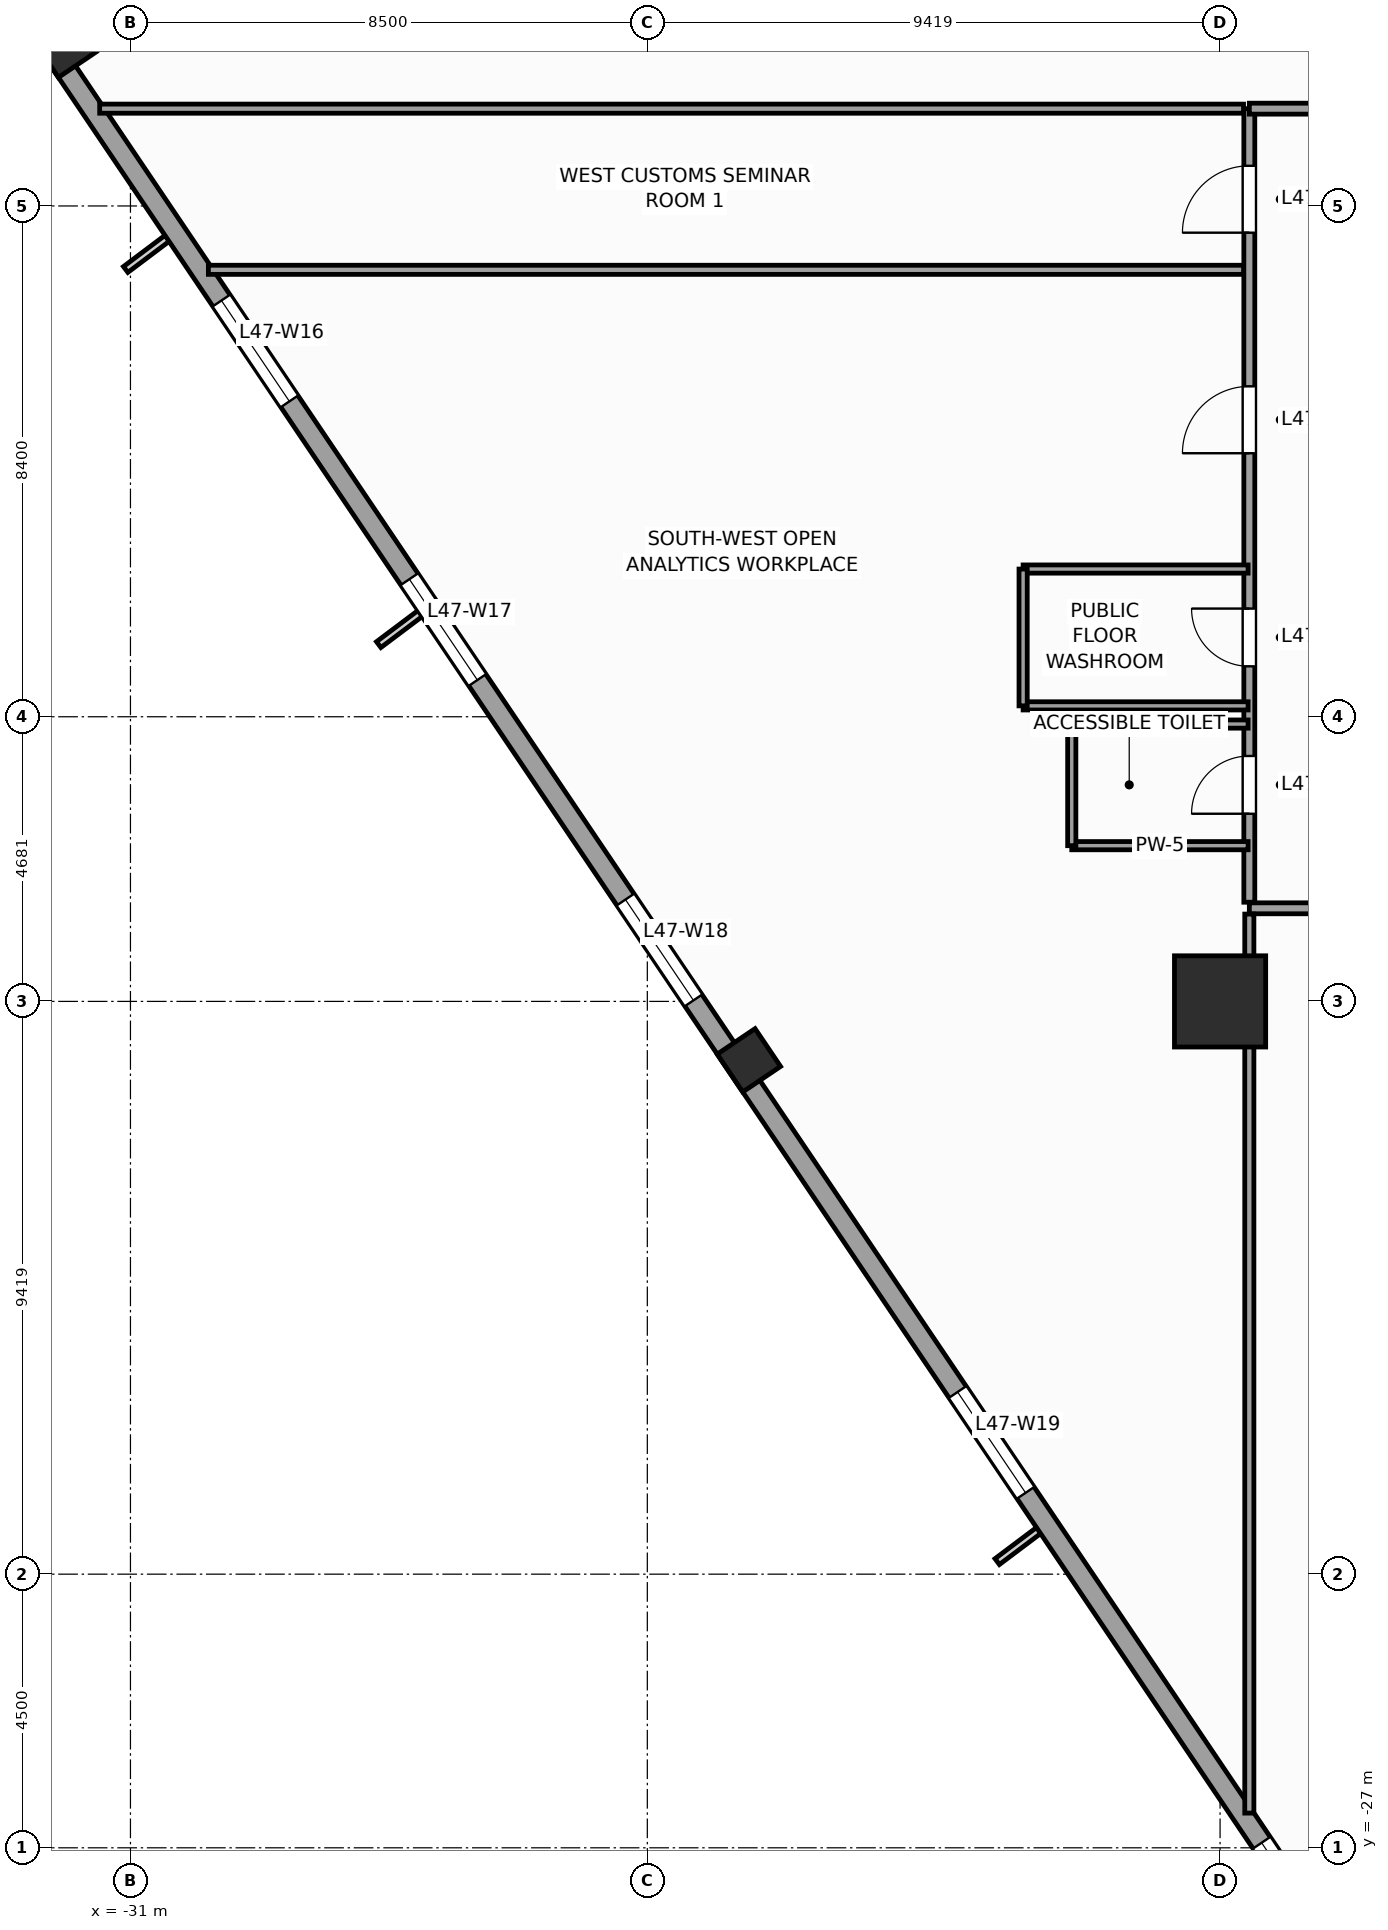
"""IFC4 building model, lengths in metres.
Left out: names, types, materials, properties, quantities, classifications, styles, units other than length and angle.
Written with IfcOpenShell. Run it as: python <this file> out.ifc"""

import sys

from ifc_helpers import new_model, si_unit, direction, frame, frame_2d, origin, origin_2d, place, context, subcontext, project, spatial, rectangle, extrude, source, transform, mapped, element, fill, save


model = new_model("IFC4")
c1 = context("Model", 3, precision=1e-05, world=origin(), true_north=direction((0.0, 1.0)))
c2 = subcontext(c1, "Body", "Model", "MODEL_VIEW")
j1 = project(units=[si_unit("LENGTHUNIT", "METRE"), si_unit("PLANEANGLEUNIT", "RADIAN")], contexts=[c1])
p1 = place(None, origin())
s1 = spatial("IfcSite", under=j1, at=p1, CompositionType="ELEMENT")
p2 = place(p1, origin())
s2 = spatial("IfcBuilding", under=s1, at=p2, CompositionType="ELEMENT")
p3 = place(p2, frame((0.0, 0.0, 196.4)))
s3 = spatial("IfcBuildingStorey", under=s2, at=p3, CompositionType="ELEMENT", Elevation=196.4)
m1 = source(origin(), c2, "Body", "SweptSolid", [
    extrude(rectangle(XDim=1.5, YDim=1.5, at=origin_2d()), origin(), (0.0, 0.0, 1.0), 4.0),
])
p4 = place(p3, frame((-13.081, -13.081, 0.0), z_axis=(0.0, 0.0, 1.0), x_axis=(1.0, 0.0, 0.0)))
e1 = element("IfcColumn", 1, at=p4, inside=s3, PredefinedType="COLUMN", context=c2, shape_type="MappedRepresentation", body=[
    mapped(m1, transform((0.0, 0.0, 0.0), scale=1.0)),
])
m2 = source(origin(), c2, "Body", "SweptSolid", [
    extrude(rectangle(XDim=0.75, YDim=0.75, at=origin_2d()), origin(), (0.0, 0.0, 1.0), 4.0),
])
for number, where, z_axis, x_axis in (
    (2, (-32.083, 2.635, 0.0), (0.0, 0.0, 1.0), (0.829, 0.559, 0.0)),
    (3, (-20.83, -14.05, 0.0), (0.0, 0.0, 1.0), (0.829, 0.559, 0.0)),
):
    element("IfcColumn", number, at=place(p3, frame(where, z_axis=z_axis, x_axis=x_axis)), inside=s3, PredefinedType="COLUMN", context=c2, shape_type="MappedRepresentation", body=[
        mapped(m2, transform((0.0, 0.0, 0.0), scale=1.0)),
    ])
p5 = place(p3, frame((-28.223, 5.486, 0.0), z_axis=(0.0, 0.0, 1.0), x_axis=(-0.82905227345, -0.559171107879, 0.0)))
e4 = element("IfcWall", 4, at=p5, inside=s3, PredefinedType="STANDARD", context=c2, shape_type="SweptSolid", body=[
    extrude(rectangle(XDim=5.17, YDim=0.34, at=frame_2d((2.585, 0.0))), origin(), (0.0, 0.0, 1.0), 2.2),
])
p6 = place(p3, frame((-32.558, 2.972, 0.0), z_axis=(0.0, 0.0, 1.0), x_axis=(0.559194910251, -0.829036218961, 0.0)))
e5 = element("IfcWall", 5, at=p6, inside=s3, PredefinedType="STANDARD", context=c2, shape_type="SweptSolid", body=[
    extrude(rectangle(XDim=41.34, YDim=0.34, at=frame_2d((20.67, 0.0))), origin(), (0.0, 0.0, 1.0), 2.2),
])
p7 = place(p6, frame((5.461, 0.0, 0.67)))
e6 = element("IfcOpeningElement", 6, at=p7, cuts=e5, PredefinedType="OPENING", context=c2, shape_type="SweptSolid", body=[
    extrude(rectangle(XDim=2.0, YDim=1.45, at=frame_2d((1.0, 0.725))), frame((0.0, 0.18, 0.0), z_axis=(0.0, -1.0, 0.0), x_axis=(1.0, 0.0, 0.0)), (0.0, 0.0, 1.0), 0.36),
])
p8 = place(p6, frame((10.989, 0.0, 0.67)))
e7 = element("IfcOpeningElement", 7, at=p8, cuts=e5, PredefinedType="OPENING", context=c2, shape_type="SweptSolid", body=[
    extrude(rectangle(XDim=2.0, YDim=1.45, at=frame_2d((1.0, 0.725))), frame((0.0, 0.18, 0.0), z_axis=(0.0, -1.0, 0.0), x_axis=(1.0, 0.0, 0.0)), (0.0, 0.0, 1.0), 0.36),
])
p9 = place(p6, frame((17.343, 0.0, 0.67)))
e8 = element("IfcOpeningElement", 8, at=p9, cuts=e5, PredefinedType="OPENING", context=c2, shape_type="SweptSolid", body=[
    extrude(rectangle(XDim=2.0, YDim=1.45, at=frame_2d((1.0, 0.725))), frame((0.0, 0.18, 0.0), z_axis=(0.0, -1.0, 0.0), x_axis=(1.0, 0.0, 0.0)), (0.0, 0.0, 1.0), 0.36),
])
p10 = place(p6, frame((27.111, 0.0, 0.67)))
e9 = element("IfcOpeningElement", 9, at=p10, cuts=e5, PredefinedType="OPENING", context=c2, shape_type="SweptSolid", body=[
    extrude(rectangle(XDim=2.0, YDim=1.45, at=frame_2d((1.0, 0.725))), frame((0.0, 0.18, 0.0), z_axis=(0.0, -1.0, 0.0), x_axis=(1.0, 0.0, 0.0)), (0.0, 0.0, 1.0), 0.36),
])
p11 = place(p6, frame((36.052, 0.0, 0.67)))
e10 = element("IfcOpeningElement", 10, at=p11, cuts=e5, PredefinedType="OPENING", context=c2, shape_type="SweptSolid", body=[
    extrude(rectangle(XDim=2.0, YDim=1.45, at=frame_2d((1.0, 0.725))), frame((0.0, 0.18, 0.0), z_axis=(0.0, -1.0, 0.0), x_axis=(1.0, 0.0, 0.0)), (0.0, 0.0, 1.0), 0.36),
])
p12 = place(p3, frame((-12.6, -11.55, 0.0), z_axis=(0.0, 0.0, 1.0), x_axis=(1.0, 0.0, 0.0)))
e11 = element("IfcWall", 11, at=p12, inside=s3, PredefinedType="PARTITIONING", context=c2, shape_type="SweptSolid", body=[
    extrude(rectangle(XDim=25.2, YDim=0.18, at=frame_2d((12.6, 0.0))), origin(), (0.0, 0.0, 1.0), 3.6),
])
p13 = place(p12, frame((3.165, 0.0, 0.0)))
e12 = element("IfcOpeningElement", 12, at=p13, cuts=e11, PredefinedType="OPENING", context=c2, shape_type="SweptSolid", body=[
    extrude(rectangle(XDim=1.1, YDim=2.2, at=frame_2d((0.55, 1.1))), frame((0.0, 0.1, 0.0), z_axis=(0.0, -1.0, 0.0), x_axis=(1.0, 0.0, 0.0)), (0.0, 0.0, 1.0), 0.2),
])
p14 = place(p12, frame((9.3, 0.0, 0.0)))
e13 = element("IfcOpeningElement", 13, at=p14, cuts=e11, PredefinedType="OPENING", context=c2, shape_type="SweptSolid", body=[
    extrude(rectangle(XDim=1.1, YDim=2.2, at=frame_2d((0.55, 1.1))), frame((0.0, 0.1, 0.0), z_axis=(0.0, -1.0, 0.0), x_axis=(1.0, 0.0, 0.0)), (0.0, 0.0, 1.0), 0.2),
])
p15 = place(p12, frame((14.8, 0.0, 0.0)))
e14 = element("IfcOpeningElement", 14, at=p15, cuts=e11, PredefinedType="OPENING", context=c2, shape_type="SweptSolid", body=[
    extrude(rectangle(XDim=1.1, YDim=2.2, at=frame_2d((0.55, 1.1))), frame((0.0, 0.1, 0.0), z_axis=(0.0, -1.0, 0.0), x_axis=(1.0, 0.0, 0.0)), (0.0, 0.0, 1.0), 0.2),
])
p16 = place(p12, frame((20.936, 0.0, 0.0)))
e15 = element("IfcOpeningElement", 15, at=p16, cuts=e11, PredefinedType="OPENING", context=c2, shape_type="SweptSolid", body=[
    extrude(rectangle(XDim=1.1, YDim=2.2, at=frame_2d((0.55, 1.1))), frame((0.0, 0.1, 0.0), z_axis=(0.0, -1.0, 0.0), x_axis=(1.0, 0.0, 0.0)), (0.0, 0.0, 1.0), 0.2),
])
p17 = place(p3, frame((-12.6, -11.45, 0.0), z_axis=(0.0, 0.0, 1.0), x_axis=(0.0, 1.0, 0.0)))
e16 = element("IfcWall", 16, at=p17, inside=s3, PredefinedType="PARTITIONING", context=c2, shape_type="SweptSolid", body=[
    extrude(rectangle(XDim=13.05, YDim=0.18, at=frame_2d((6.525, 0.0))), origin(), (0.0, 0.0, 1.0), 2.56),
])
p18 = place(p17, frame((1.455, 0.0, 0.0)))
e17 = element("IfcOpeningElement", 17, at=p18, cuts=e16, PredefinedType="OPENING", context=c2, shape_type="SweptSolid", body=[
    extrude(rectangle(XDim=0.95, YDim=2.1, at=frame_2d((0.475, 1.05))), frame((0.0, 0.1, 0.0), z_axis=(0.0, -1.0, 0.0), x_axis=(1.0, 0.0, 0.0)), (0.0, 0.0, 1.0), 0.2),
])
p19 = place(p17, frame((3.879, 0.0, 0.0)))
e18 = element("IfcOpeningElement", 18, at=p19, cuts=e16, PredefinedType="OPENING", context=c2, shape_type="SweptSolid", body=[
    extrude(rectangle(XDim=0.95, YDim=2.1, at=frame_2d((0.475, 1.05))), frame((0.0, 0.1, 0.0), z_axis=(0.0, -1.0, 0.0), x_axis=(1.0, 0.0, 0.0)), (0.0, 0.0, 1.0), 0.2),
])
p20 = place(p17, frame((11.01, 0.0, 0.0)))
e19 = element("IfcOpeningElement", 19, at=p20, cuts=e16, PredefinedType="OPENING", context=c2, shape_type="SweptSolid", body=[
    extrude(rectangle(XDim=1.1, YDim=2.2, at=frame_2d((0.55, 1.1))), frame((0.0, 0.1, 0.0), z_axis=(0.0, -1.0, 0.0), x_axis=(1.0, 0.0, 0.0)), (0.0, 0.0, 1.0), 0.2),
])
p21 = place(p17, frame((7.384, 0.0, 0.0)))
e20 = element("IfcOpeningElement", 20, at=p21, cuts=e16, PredefinedType="OPENING", context=c2, shape_type="SweptSolid", body=[
    extrude(rectangle(XDim=1.1, YDim=2.2, at=frame_2d((0.55, 1.1))), frame((0.0, 0.1, 0.0), z_axis=(0.0, -1.0, 0.0), x_axis=(1.0, 0.0, 0.0)), (0.0, 0.0, 1.0), 0.2),
])
p22 = place(p3, frame((-12.6, 1.6, 0.0), z_axis=(0.0, 0.0, 1.0), x_axis=(1.0, 0.0, 0.0)))
e21 = element("IfcWall", 21, at=p22, inside=s3, PredefinedType="PARTITIONING", context=c2, shape_type="SweptSolid", body=[
    extrude(rectangle(XDim=3.9, YDim=0.18, at=frame_2d((1.95, 0.0))), origin(), (0.0, 0.0, 1.0), 3.6),
])
p23 = place(p22, frame((1.4, 0.0, 0.0)))
e22 = element("IfcOpeningElement", 22, at=p23, cuts=e21, PredefinedType="OPENING", context=c2, shape_type="SweptSolid", body=[
    extrude(rectangle(XDim=1.1, YDim=2.2, at=frame_2d((0.55, 1.1))), frame((0.0, 0.1, 0.0), z_axis=(0.0, -1.0, 0.0), x_axis=(1.0, 0.0, 0.0)), (0.0, 0.0, 1.0), 0.2),
])
p24 = place(p3, frame((-29.719, -1.05, 0.0), z_axis=(0.0, 0.0, 1.0), x_axis=(1.0, 0.0, 0.0)))
e23 = element("IfcWall", 23, at=p24, inside=s3, PredefinedType="PARTITIONING", context=c2, shape_type="SweptSolid", body=[
    extrude(rectangle(XDim=17.023, YDim=0.15, at=frame_2d((8.512, 0.0))), origin(), (0.0, 0.0, 1.0), 3.6),
])
p25 = place(p3, frame((-31.506, 1.6, 0.0), z_axis=(0.0, 0.0, 1.0), x_axis=(1.0, 0.0, 0.0)))
e24 = element("IfcWall", 24, at=p25, inside=s3, PredefinedType="PARTITIONING", context=c2, shape_type="SweptSolid", body=[
    extrude(rectangle(XDim=18.811, YDim=0.15, at=frame_2d((9.406, 0.0))), origin(), (0.0, 0.0, 1.0), 3.6),
])
p26 = place(p3, frame((-12.6, -26.429, 0.0), z_axis=(0.0, 0.0, 1.0), x_axis=(0.0, 1.0, 0.0)))
e25 = element("IfcWall", 25, at=p26, inside=s3, PredefinedType="PARTITIONING", context=c2, shape_type="SweptSolid", body=[
    extrude(rectangle(XDim=14.784, YDim=0.15, at=frame_2d((7.392, 0.0))), origin(), (0.0, 0.0, 1.0), 2.2),
])
for number, where, z_axis, x_axis in (
    (26, (-15.52, -10.52, 0.0), (0.0, 0.0, 1.0), (1.0, 0.0, 0.0)),
    (27, (-15.52, -8.52, 0.0), (0.0, 0.0, 1.0), (1.0, 0.0, 0.0)),
):
    element("IfcWall", number, at=place(p3, frame(where, z_axis=z_axis, x_axis=x_axis)), inside=s3, PredefinedType="PARTITIONING", context=c2, shape_type="SweptSolid", body=[
        extrude(rectangle(XDim=2.9, YDim=0.135, at=frame_2d((1.45, 0.0))), origin(), (0.0, 0.0, 1.0), 3.6),
    ])
p27 = place(p3, frame((-15.52, -10.52, 0.0), z_axis=(0.0, 0.0, 1.0), x_axis=(0.0, 1.0, 0.0)))
e28 = element("IfcWall", 28, at=p27, inside=s3, PredefinedType="PARTITIONING", context=c2, shape_type="SweptSolid", body=[
    extrude(rectangle(XDim=2.0, YDim=0.135, at=frame_2d((1.0, 0.0))), origin(), (0.0, 0.0, 1.0), 3.6),
])
for number, where, z_axis, x_axis in (
    (29, (-16.32, -8.221, 0.0), (0.0, 0.0, 1.0), (1.0, 0.0, 0.0)),
    (30, (-16.32, -5.971, 0.0), (0.0, 0.0, 1.0), (1.0, 0.0, 0.0)),
):
    element("IfcWall", number, at=place(p3, frame(where, z_axis=z_axis, x_axis=x_axis)), inside=s3, PredefinedType="PARTITIONING", context=c2, shape_type="SweptSolid", body=[
        extrude(rectangle(XDim=3.7, YDim=0.135, at=frame_2d((1.85, 0.0))), origin(), (0.0, 0.0, 1.0), 3.6),
    ])
p28 = place(p3, frame((-16.32, -8.221, 0.0), z_axis=(0.0, 0.0, 1.0), x_axis=(0.0, 1.0, 0.0)))
e31 = element("IfcWall", 31, at=p28, inside=s3, PredefinedType="PARTITIONING", context=c2, shape_type="SweptSolid", body=[
    extrude(rectangle(XDim=2.25, YDim=0.135, at=frame_2d((1.125, 0.0))), origin(), (0.0, 0.0, 1.0), 3.6),
])
m3 = source(origin(), c2, "Body", "SweptSolid", [
    extrude(rectangle(XDim=2.0, YDim=1.45, at=frame_2d((1.0, 0.725))), frame((0.0, 0.03, 0.0), z_axis=(0.0, -1.0, 0.0), x_axis=(1.0, 0.0, 0.0)), (0.0, 0.0, 1.0), 0.06),
])
p29 = place(p7, origin())
e32 = element("IfcWindow", 32, at=p29, inside=s3, PartitioningType="SINGLE_PANEL", PredefinedType="WINDOW", context=c2, shape_type="MappedRepresentation", body=[
    mapped(m3, transform((0.0, 0.0, 0.0), scale=1.0)),
])
fill(e6, e32)
p30 = place(p8, origin())
e33 = element("IfcWindow", 33, at=p30, inside=s3, PartitioningType="SINGLE_PANEL", PredefinedType="WINDOW", context=c2, shape_type="MappedRepresentation", body=[
    mapped(m3, transform((0.0, 0.0, 0.0), scale=1.0)),
])
fill(e7, e33)
p31 = place(p9, origin())
e34 = element("IfcWindow", 34, at=p31, inside=s3, PartitioningType="SINGLE_PANEL", PredefinedType="WINDOW", context=c2, shape_type="MappedRepresentation", body=[
    mapped(m3, transform((0.0, 0.0, 0.0), scale=1.0)),
])
fill(e8, e34)
p32 = place(p10, origin())
e35 = element("IfcWindow", 35, at=p32, inside=s3, PartitioningType="SINGLE_PANEL", PredefinedType="WINDOW", context=c2, shape_type="MappedRepresentation", body=[
    mapped(m3, transform((0.0, 0.0, 0.0), scale=1.0)),
])
fill(e9, e35)
p33 = place(p11, origin())
e36 = element("IfcWindow", 36, at=p33, inside=s3, PartitioningType="SINGLE_PANEL", PredefinedType="WINDOW", context=c2, shape_type="MappedRepresentation", body=[
    mapped(m3, transform((0.0, 0.0, 0.0), scale=1.0)),
])
fill(e10, e36)
m4 = source(origin(), c2, "Body", "SweptSolid", [
    extrude(rectangle(XDim=0.95, YDim=2.1, at=frame_2d((0.475, 1.05))), frame((0.0, 0.025, 0.0), z_axis=(0.0, -1.0, 0.0), x_axis=(1.0, 0.0, 0.0)), (0.0, 0.0, 1.0), 0.05),
])
p34 = place(p18, origin())
e37 = element("IfcDoor", 37, at=p34, inside=s3, OperationType="SINGLE_SWING_LEFT", PredefinedType="DOOR", context=c2, shape_type="MappedRepresentation", body=[
    mapped(m4, transform((0.0, 0.0, 0.0), scale=1.0)),
])
fill(e17, e37)
p35 = place(p19, origin())
e38 = element("IfcDoor", 38, at=p35, inside=s3, OperationType="SINGLE_SWING_RIGHT", PredefinedType="DOOR", context=c2, shape_type="MappedRepresentation", body=[
    mapped(m4, transform((0.0, 0.0, 0.0), scale=1.0)),
])
fill(e18, e38)
m5 = source(origin(), c2, "Body", "SweptSolid", [
    extrude(rectangle(XDim=1.1, YDim=2.2, at=frame_2d((0.55, 1.1))), frame((0.0, 0.025, 0.0), z_axis=(0.0, -1.0, 0.0), x_axis=(1.0, 0.0, 0.0)), (0.0, 0.0, 1.0), 0.05),
])
p36 = place(p20, origin())
e39 = element("IfcDoor", 39, at=p36, inside=s3, OperationType="SINGLE_SWING_LEFT", PredefinedType="DOOR", context=c2, shape_type="MappedRepresentation", body=[
    mapped(m5, transform((0.0, 0.0, 0.0), scale=1.0)),
])
fill(e19, e39)
p37 = place(p21, origin())
e40 = element("IfcDoor", 40, at=p37, inside=s3, OperationType="SINGLE_SWING_LEFT", PredefinedType="DOOR", context=c2, shape_type="MappedRepresentation", body=[
    mapped(m5, transform((0.0, 0.0, 0.0), scale=1.0)),
])
fill(e20, e40)
save(model, sys.argv[1])
